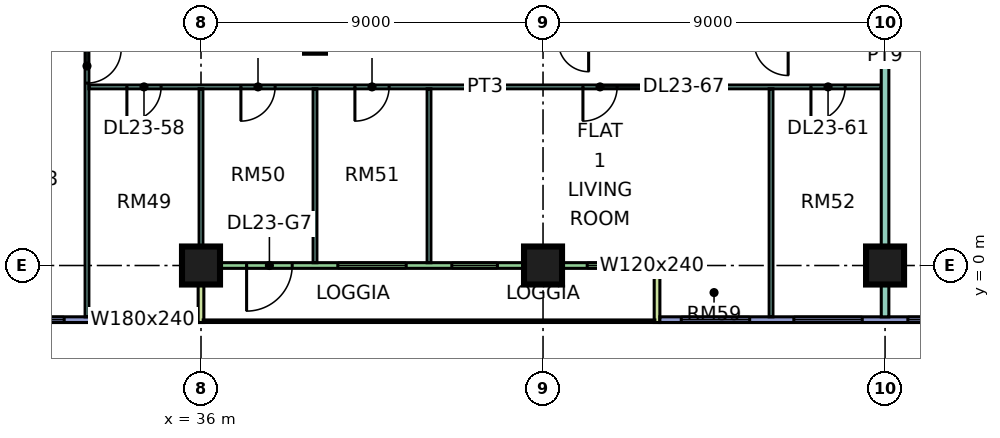
"""IFC4 building model, lengths in metres.
Left out: names, types, materials, properties, quantities, classifications, styles, units other than length and angle.
Written with IfcOpenShell. Run it as: python <this file> out.ifc"""

import sys

from ifc_helpers import new_model, si_unit, direction, frame, frame_2d, origin, origin_2d, place, context, subcontext, project, spatial, rectangle, extrude, element, fill, save


model = new_model("IFC4")
c1 = context("Model", 3, precision=1e-05, world=origin(), true_north=direction((0.0, 1.0)))
c2 = subcontext(c1, "Body", "Model", "MODEL_VIEW")
j1 = project(units=[si_unit("LENGTHUNIT", "METRE"), si_unit("PLANEANGLEUNIT", "RADIAN")], contexts=[c1])
p1 = place(None, origin())
s1 = spatial("IfcSite", under=j1, at=p1, CompositionType="ELEMENT")
p2 = place(p1, origin())
s2 = spatial("IfcBuilding", under=s1, at=p2, CompositionType="ELEMENT")
p3 = place(p2, frame((0.0, 0.0, 103.15)))
s3 = spatial("IfcBuildingStorey", under=s2, at=p3, CompositionType="ELEMENT", Elevation=103.15)
for number, where, z_axis, x_axis in (
    (1, (36.0, 0.0, 0.0), (0.0, 0.0, 1.0), (1.0, 0.0, 0.0)),
    (2, (45.0, 0.0, 0.0), (0.0, 0.0, 1.0), (1.0, 0.0, 0.0)),
    (3, (54.0, 0.0, 0.0), (0.0, 0.0, 1.0), (1.0, 0.0, 0.0)),
):
    element("IfcColumn", number, at=place(p3, frame(where, z_axis=z_axis, x_axis=x_axis)), inside=s3, PredefinedType="COLUMN", context=c2, shape_type="SweptSolid", body=[
        extrude(rectangle(XDim=1.0, YDim=1.0, at=origin_2d()), origin(), (0.0, 0.0, 1.0), 3.75),
    ])
p4 = place(p3, frame((37.2, 5.725, 0.0), z_axis=(0.0, 0.0, 1.0), x_axis=(1.0, 0.0, 0.0)))
e4 = element("IfcWall", 4, at=p4, inside=s3, PredefinedType="SHEAR", context=c2, shape_type="SweptSolid", body=[
    extrude(rectangle(XDim=3.45, YDim=0.25, at=frame_2d((1.725, 0.0))), origin(), (0.0, 0.0, 1.0), 3.75),
])
p5 = place(p3, frame((24.075, -1.425, 0.0), z_axis=(0.0, 0.0, 1.0), x_axis=(1.0, 0.0, 0.0)))
e5 = element("IfcWall", 5, at=p5, inside=s3, PredefinedType="SOLIDWALL", context=c2, shape_type="SweptSolid", body=[
    extrude(rectangle(XDim=11.85, YDim=0.15, at=frame_2d((5.925, 0.0))), origin(), (0.0, 0.0, 1.0), 3.35),
])
p6 = place(p5, frame((0.562, 0.0, 0.45)))
e6 = element("IfcOpeningElement", 6, at=p6, cuts=e5, PredefinedType="OPENING", context=c2, shape_type="SweptSolid", body=[
    extrude(rectangle(XDim=1.8, YDim=2.4, at=frame_2d((0.9, 1.2))), frame((0.0, 0.085, 0.0), z_axis=(0.0, -1.0, 0.0), x_axis=(1.0, 0.0, 0.0)), (0.0, 0.0, 1.0), 0.17),
])
p7 = place(p5, frame((3.525, 0.0, 0.45)))
e7 = element("IfcOpeningElement", 7, at=p7, cuts=e5, PredefinedType="OPENING", context=c2, shape_type="SweptSolid", body=[
    extrude(rectangle(XDim=1.8, YDim=2.4, at=frame_2d((0.9, 1.2))), frame((0.0, 0.085, 0.0), z_axis=(0.0, -1.0, 0.0), x_axis=(1.0, 0.0, 0.0)), (0.0, 0.0, 1.0), 0.17),
])
p8 = place(p5, frame((6.525, 0.0, 0.45)))
e8 = element("IfcOpeningElement", 8, at=p8, cuts=e5, PredefinedType="OPENING", context=c2, shape_type="SweptSolid", body=[
    extrude(rectangle(XDim=1.8, YDim=2.4, at=frame_2d((0.9, 1.2))), frame((0.0, 0.085, 0.0), z_axis=(0.0, -1.0, 0.0), x_axis=(1.0, 0.0, 0.0)), (0.0, 0.0, 1.0), 0.17),
])
p9 = place(p5, frame((9.488, 0.0, 0.45)))
e9 = element("IfcOpeningElement", 9, at=p9, cuts=e5, PredefinedType="OPENING", context=c2, shape_type="SweptSolid", body=[
    extrude(rectangle(XDim=1.8, YDim=2.4, at=frame_2d((0.9, 1.2))), frame((0.0, 0.085, 0.0), z_axis=(0.0, -1.0, 0.0), x_axis=(1.0, 0.0, 0.0)), (0.0, 0.0, 1.0), 0.17),
])
p10 = place(p3, frame((36.075, 0.0, 0.0), z_axis=(0.0, 0.0, 1.0), x_axis=(1.0, 0.0, 0.0)))
e10 = element("IfcWall", 10, at=p10, inside=s3, PredefinedType="SOLIDWALL", context=c2, shape_type="SweptSolid", body=[
    extrude(rectangle(XDim=11.85, YDim=0.15, at=frame_2d((5.925, 0.0))), origin(), (0.0, 0.0, 1.0), 3.35),
])
p11 = place(p10, frame((1.125, 0.0, 0.0)))
e11 = element("IfcOpeningElement", 11, at=p11, cuts=e10, PredefinedType="OPENING", context=c2, shape_type="SweptSolid", body=[
    extrude(rectangle(XDim=1.2, YDim=2.4, at=frame_2d((0.6, 1.2))), frame((0.0, 0.085, 0.0), z_axis=(0.0, -1.0, 0.0), x_axis=(1.0, 0.0, 0.0)), (0.0, 0.0, 1.0), 0.17),
])
p12 = place(p10, frame((3.525, 0.0, 0.45)))
e12 = element("IfcOpeningElement", 12, at=p12, cuts=e10, PredefinedType="OPENING", context=c2, shape_type="SweptSolid", body=[
    extrude(rectangle(XDim=1.8, YDim=2.4, at=frame_2d((0.9, 1.2))), frame((0.0, 0.085, 0.0), z_axis=(0.0, -1.0, 0.0), x_axis=(1.0, 0.0, 0.0)), (0.0, 0.0, 1.0), 0.17),
])
p13 = place(p10, frame((6.525, 0.0, 0.45)))
e13 = element("IfcOpeningElement", 13, at=p13, cuts=e10, PredefinedType="OPENING", context=c2, shape_type="SweptSolid", body=[
    extrude(rectangle(XDim=1.2, YDim=2.4, at=frame_2d((0.6, 1.2))), frame((0.0, 0.085, 0.0), z_axis=(0.0, -1.0, 0.0), x_axis=(1.0, 0.0, 0.0)), (0.0, 0.0, 1.0), 0.17),
])
p14 = place(p10, frame((10.087, 0.0, 0.45)))
e14 = element("IfcOpeningElement", 14, at=p14, cuts=e10, PredefinedType="OPENING", context=c2, shape_type="SweptSolid", body=[
    extrude(rectangle(XDim=1.2, YDim=2.4, at=frame_2d((0.6, 1.2))), frame((0.0, 0.085, 0.0), z_axis=(0.0, -1.0, 0.0), x_axis=(1.0, 0.0, 0.0)), (0.0, 0.0, 1.0), 0.17),
])
for number, where, z_axis, x_axis in (
    (15, (36.0, -1.5, 0.0), (0.0, 0.0, 1.0), (0.0, 1.0, 0.0)),
    (16, (48.0, -1.5, 0.0), (0.0, 0.0, 1.0), (0.0, 1.0, 0.0)),
):
    element("IfcWall", number, at=place(p3, frame(where, z_axis=z_axis, x_axis=x_axis)), inside=s3, PredefinedType="SOLIDWALL", context=c2, shape_type="SweptSolid", body=[
        extrude(rectangle(XDim=1.5, YDim=0.15, at=frame_2d((0.75, 0.0))), origin(), (0.0, 0.0, 1.0), 3.35),
    ])
p15 = place(p3, frame((48.075, -1.425, 0.0), z_axis=(0.0, 0.0, 1.0), x_axis=(1.0, 0.0, 0.0)))
e17 = element("IfcWall", 17, at=p15, inside=s3, PredefinedType="SOLIDWALL", context=c2, shape_type="SweptSolid", body=[
    extrude(rectangle(XDim=11.85, YDim=0.15, at=frame_2d((5.925, 0.0))), origin(), (0.0, 0.0, 1.0), 3.35),
])
p16 = place(p15, frame((0.562, 0.0, 0.45)))
e18 = element("IfcOpeningElement", 18, at=p16, cuts=e17, PredefinedType="OPENING", context=c2, shape_type="SweptSolid", body=[
    extrude(rectangle(XDim=1.8, YDim=2.4, at=frame_2d((0.9, 1.2))), frame((0.0, 0.085, 0.0), z_axis=(0.0, -1.0, 0.0), x_axis=(1.0, 0.0, 0.0)), (0.0, 0.0, 1.0), 0.17),
])
p17 = place(p15, frame((3.525, 0.0, 0.45)))
e19 = element("IfcOpeningElement", 19, at=p17, cuts=e17, PredefinedType="OPENING", context=c2, shape_type="SweptSolid", body=[
    extrude(rectangle(XDim=1.8, YDim=2.4, at=frame_2d((0.9, 1.2))), frame((0.0, 0.085, 0.0), z_axis=(0.0, -1.0, 0.0), x_axis=(1.0, 0.0, 0.0)), (0.0, 0.0, 1.0), 0.17),
])
p18 = place(p15, frame((6.525, 0.0, 0.45)))
e20 = element("IfcOpeningElement", 20, at=p18, cuts=e17, PredefinedType="OPENING", context=c2, shape_type="SweptSolid", body=[
    extrude(rectangle(XDim=1.8, YDim=2.4, at=frame_2d((0.9, 1.2))), frame((0.0, 0.085, 0.0), z_axis=(0.0, -1.0, 0.0), x_axis=(1.0, 0.0, 0.0)), (0.0, 0.0, 1.0), 0.17),
])
p19 = place(p15, frame((9.488, 0.0, 0.45)))
e21 = element("IfcOpeningElement", 21, at=p19, cuts=e17, PredefinedType="OPENING", context=c2, shape_type="SweptSolid", body=[
    extrude(rectangle(XDim=1.8, YDim=2.4, at=frame_2d((0.9, 1.2))), frame((0.0, 0.085, 0.0), z_axis=(0.0, -1.0, 0.0), x_axis=(1.0, 0.0, 0.0)), (0.0, 0.0, 1.0), 0.17),
])
p20 = place(p3, frame((33.0, -1.351, 0.0), z_axis=(0.0, 0.0, 1.0), x_axis=(0.0, 1.0, 0.0)))
e22 = element("IfcWall", 22, at=p20, inside=s3, PredefinedType="PARTITIONING", context=c2, shape_type="SweptSolid", body=[
    extrude(rectangle(XDim=7.201, YDim=0.1, at=frame_2d((3.601, 0.0))), origin(), (0.0, 0.0, 1.0), 3.35),
])
p21 = place(p20, frame((6.151, 0.0, 0.0)))
e23 = element("IfcOpeningElement", 23, at=p21, cuts=e22, PredefinedType="OPENING", context=c2, shape_type="SweptSolid", body=[
    extrude(rectangle(XDim=0.9, YDim=2.1, at=frame_2d((0.45, 1.05))), frame((0.0, 0.06, 0.0), z_axis=(0.0, -1.0, 0.0), x_axis=(1.0, 0.0, 0.0)), (0.0, 0.0, 1.0), 0.12),
])
p22 = place(p3, frame((33.05, 4.7, 0.0), z_axis=(0.0, 0.0, 1.0), x_axis=(1.0, 0.0, 0.0)))
e24 = element("IfcWall", 24, at=p22, inside=s3, PredefinedType="PARTITIONING", context=c2, shape_type="SweptSolid", body=[
    extrude(rectangle(XDim=20.85, YDim=0.1, at=frame_2d((10.425, 0.0))), origin(), (0.0, 0.0, 1.0), 3.35),
])
p23 = place(p22, frame((1.0, 0.0, 0.0)))
e25 = element("IfcOpeningElement", 25, at=p23, cuts=e24, PredefinedType="OPENING", context=c2, shape_type="SweptSolid", body=[
    extrude(rectangle(XDim=0.9, YDim=2.1, at=frame_2d((0.45, 1.05))), frame((0.0, 0.06, 0.0), z_axis=(0.0, -1.0, 0.0), x_axis=(1.0, 0.0, 0.0)), (0.0, 0.0, 1.0), 0.12),
])
p24 = place(p22, frame((4.0, 0.0, 0.0)))
e26 = element("IfcOpeningElement", 26, at=p24, cuts=e24, PredefinedType="OPENING", context=c2, shape_type="SweptSolid", body=[
    extrude(rectangle(XDim=0.9, YDim=2.1, at=frame_2d((0.45, 1.05))), frame((0.0, 0.06, 0.0), z_axis=(0.0, -1.0, 0.0), x_axis=(1.0, 0.0, 0.0)), (0.0, 0.0, 1.0), 0.12),
])
p25 = place(p22, frame((7.0, 0.0, 0.0)))
e27 = element("IfcOpeningElement", 27, at=p25, cuts=e24, PredefinedType="OPENING", context=c2, shape_type="SweptSolid", body=[
    extrude(rectangle(XDim=0.9, YDim=2.1, at=frame_2d((0.45, 1.05))), frame((0.0, 0.06, 0.0), z_axis=(0.0, -1.0, 0.0), x_axis=(1.0, 0.0, 0.0)), (0.0, 0.0, 1.0), 0.12),
])
p26 = place(p22, frame((19.0, 0.0, 0.0)))
e28 = element("IfcOpeningElement", 28, at=p26, cuts=e24, PredefinedType="OPENING", context=c2, shape_type="SweptSolid", body=[
    extrude(rectangle(XDim=0.9, YDim=2.1, at=frame_2d((0.45, 1.05))), frame((0.0, 0.06, 0.0), z_axis=(0.0, -1.0, 0.0), x_axis=(1.0, 0.0, 0.0)), (0.0, 0.0, 1.0), 0.12),
])
p27 = place(p22, frame((13.0, 0.0, 0.0)))
e29 = element("IfcOpeningElement", 29, at=p27, cuts=e24, PredefinedType="OPENING", context=c2, shape_type="SweptSolid", body=[
    extrude(rectangle(XDim=0.9, YDim=2.1, at=frame_2d((0.45, 1.05))), frame((0.0, 0.06, 0.0), z_axis=(0.0, -1.0, 0.0), x_axis=(1.0, 0.0, 0.0)), (0.0, 0.0, 1.0), 0.12),
])
p28 = place(p3, frame((36.0, 0.0, 0.0), z_axis=(0.0, 0.0, 1.0), x_axis=(0.0, 1.0, 0.0)))
e30 = element("IfcWall", 30, at=p28, inside=s3, PredefinedType="PARTITIONING", context=c2, shape_type="SweptSolid", body=[
    extrude(rectangle(XDim=4.65, YDim=0.1, at=frame_2d((2.325, 0.0))), origin(), (0.0, 0.0, 1.0), 3.35),
])
for number, where, z_axis, x_axis in (
    (31, (39.0, 0.074, 0.0), (0.0, 0.0, 1.0), (0.0, 1.0, 0.0)),
    (32, (42.0, 0.074, 0.0), (0.0, 0.0, 1.0), (0.0, 1.0, 0.0)),
):
    element("IfcWall", number, at=place(p3, frame(where, z_axis=z_axis, x_axis=x_axis)), inside=s3, PredefinedType="PARTITIONING", context=c2, shape_type="SweptSolid", body=[
        extrude(rectangle(XDim=4.576, YDim=0.1, at=frame_2d((2.288, 0.0))), origin(), (0.0, 0.0, 1.0), 3.35),
    ])
p29 = place(p3, frame((51.0, -1.35, 0.0), z_axis=(0.0, 0.0, 1.0), x_axis=(0.0, 1.0, 0.0)))
e33 = element("IfcWall", 33, at=p29, inside=s3, PredefinedType="PARTITIONING", context=c2, shape_type="SweptSolid", body=[
    extrude(rectangle(XDim=6.0, YDim=0.1, at=frame_2d((3.0, 0.0))), origin(), (0.0, 0.0, 1.0), 3.35),
])
p30 = place(p3, frame((54.0, -1.351, 0.0), z_axis=(0.0, 0.0, 1.0), x_axis=(0.0, 1.0, 0.0)))
e34 = element("IfcWall", 34, at=p30, inside=s3, PredefinedType="PARTITIONING", context=c2, shape_type="SweptSolid", body=[
    extrude(rectangle(XDim=13.751, YDim=0.2, at=frame_2d((6.875, 0.0))), origin(), (0.0, 0.0, 1.0), 3.35),
])
p31 = place(p8, origin())
e35 = element("IfcWindow", 35, at=p31, inside=s3, PartitioningType="SINGLE_PANEL", PredefinedType="WINDOW", context=c2, shape_type="SweptSolid", body=[
    extrude(rectangle(XDim=1.8, YDim=2.4, at=frame_2d((0.9, 1.2))), frame((0.0, 0.03, 0.0), z_axis=(0.0, -1.0, 0.0), x_axis=(1.0, 0.0, 0.0)), (0.0, 0.0, 1.0), 0.06),
])
fill(e8, e35)
p32 = place(p9, origin())
e36 = element("IfcWindow", 36, at=p32, inside=s3, PartitioningType="SINGLE_PANEL", PredefinedType="WINDOW", context=c2, shape_type="SweptSolid", body=[
    extrude(rectangle(XDim=1.8, YDim=2.4, at=frame_2d((0.9, 1.2))), frame((0.0, 0.03, 0.0), z_axis=(0.0, -1.0, 0.0), x_axis=(1.0, 0.0, 0.0)), (0.0, 0.0, 1.0), 0.06),
])
fill(e9, e36)
p33 = place(p11, frame((1.2, 0.0, 0.0), z_axis=(0.0, 0.0, 1.0), x_axis=(-1.0, 0.0, 0.0)))
e37 = element("IfcDoor", 37, at=p33, inside=s3, OperationType="DOUBLE_DOOR_SINGLE_SWING", PredefinedType="DOOR", context=c2, shape_type="SweptSolid", body=[
    extrude(rectangle(XDim=1.2, YDim=2.4, at=frame_2d((0.6, 1.2))), frame((0.0, 0.025, 0.0), z_axis=(0.0, -1.0, 0.0), x_axis=(1.0, 0.0, 0.0)), (0.0, 0.0, 1.0), 0.05),
])
fill(e11, e37)
p34 = place(p12, origin())
e38 = element("IfcWindow", 38, at=p34, inside=s3, PartitioningType="SINGLE_PANEL", PredefinedType="WINDOW", context=c2, shape_type="SweptSolid", body=[
    extrude(rectangle(XDim=1.8, YDim=2.4, at=frame_2d((0.9, 1.2))), frame((0.0, 0.03, 0.0), z_axis=(0.0, -1.0, 0.0), x_axis=(1.0, 0.0, 0.0)), (0.0, 0.0, 1.0), 0.06),
])
fill(e12, e38)
p35 = place(p13, origin())
e39 = element("IfcWindow", 39, at=p35, inside=s3, PartitioningType="SINGLE_PANEL", PredefinedType="WINDOW", context=c2, shape_type="SweptSolid", body=[
    extrude(rectangle(XDim=1.2, YDim=2.4, at=frame_2d((0.6, 1.2))), frame((0.0, 0.03, 0.0), z_axis=(0.0, -1.0, 0.0), x_axis=(1.0, 0.0, 0.0)), (0.0, 0.0, 1.0), 0.06),
])
fill(e13, e39)
p36 = place(p14, origin())
e40 = element("IfcWindow", 40, at=p36, inside=s3, PartitioningType="SINGLE_PANEL", PredefinedType="WINDOW", context=c2, shape_type="SweptSolid", body=[
    extrude(rectangle(XDim=1.2, YDim=2.4, at=frame_2d((0.6, 1.2))), frame((0.0, 0.03, 0.0), z_axis=(0.0, -1.0, 0.0), x_axis=(1.0, 0.0, 0.0)), (0.0, 0.0, 1.0), 0.06),
])
fill(e14, e40)
p37 = place(p16, origin())
e41 = element("IfcWindow", 41, at=p37, inside=s3, PartitioningType="SINGLE_PANEL", PredefinedType="WINDOW", context=c2, shape_type="SweptSolid", body=[
    extrude(rectangle(XDim=1.8, YDim=2.4, at=frame_2d((0.9, 1.2))), frame((0.0, 0.03, 0.0), z_axis=(0.0, -1.0, 0.0), x_axis=(1.0, 0.0, 0.0)), (0.0, 0.0, 1.0), 0.06),
])
fill(e18, e41)
p38 = place(p17, origin())
e42 = element("IfcWindow", 42, at=p38, inside=s3, PartitioningType="SINGLE_PANEL", PredefinedType="WINDOW", context=c2, shape_type="SweptSolid", body=[
    extrude(rectangle(XDim=1.8, YDim=2.4, at=frame_2d((0.9, 1.2))), frame((0.0, 0.03, 0.0), z_axis=(0.0, -1.0, 0.0), x_axis=(1.0, 0.0, 0.0)), (0.0, 0.0, 1.0), 0.06),
])
fill(e19, e42)
p39 = place(p18, origin())
e43 = element("IfcWindow", 43, at=p39, inside=s3, PartitioningType="SINGLE_PANEL", PredefinedType="WINDOW", context=c2, shape_type="SweptSolid", body=[
    extrude(rectangle(XDim=1.8, YDim=2.4, at=frame_2d((0.9, 1.2))), frame((0.0, 0.03, 0.0), z_axis=(0.0, -1.0, 0.0), x_axis=(1.0, 0.0, 0.0)), (0.0, 0.0, 1.0), 0.06),
])
fill(e20, e43)
p40 = place(p21, origin())
e44 = element("IfcDoor", 44, at=p40, inside=s3, OperationType="SINGLE_SWING_RIGHT", PredefinedType="DOOR", context=c2, shape_type="SweptSolid", body=[
    extrude(rectangle(XDim=0.9, YDim=2.1, at=frame_2d((0.45, 1.05))), frame((0.0, 0.025, 0.0), z_axis=(0.0, -1.0, 0.0), x_axis=(1.0, 0.0, 0.0)), (0.0, 0.0, 1.0), 0.05),
])
fill(e23, e44)
p41 = place(p23, frame((0.9, 0.0, 0.0), z_axis=(0.0, 0.0, 1.0), x_axis=(-1.0, 0.0, 0.0)))
e45 = element("IfcDoor", 45, at=p41, inside=s3, OperationType="SINGLE_SWING_LEFT", PredefinedType="DOOR", context=c2, shape_type="SweptSolid", body=[
    extrude(rectangle(XDim=0.9, YDim=2.1, at=frame_2d((0.45, 1.05))), frame((0.0, 0.025, 0.0), z_axis=(0.0, -1.0, 0.0), x_axis=(1.0, 0.0, 0.0)), (0.0, 0.0, 1.0), 0.05),
])
fill(e25, e45)
p42 = place(p24, frame((0.9, 0.0, 0.0), z_axis=(0.0, 0.0, 1.0), x_axis=(-1.0, 0.0, 0.0)))
e46 = element("IfcDoor", 46, at=p42, inside=s3, OperationType="SINGLE_SWING_LEFT", PredefinedType="DOOR", context=c2, shape_type="SweptSolid", body=[
    extrude(rectangle(XDim=0.9, YDim=2.1, at=frame_2d((0.45, 1.05))), frame((0.0, 0.025, 0.0), z_axis=(0.0, -1.0, 0.0), x_axis=(1.0, 0.0, 0.0)), (0.0, 0.0, 1.0), 0.05),
])
fill(e26, e46)
p43 = place(p25, frame((0.9, 0.0, 0.0), z_axis=(0.0, 0.0, 1.0), x_axis=(-1.0, 0.0, 0.0)))
e47 = element("IfcDoor", 47, at=p43, inside=s3, OperationType="SINGLE_SWING_LEFT", PredefinedType="DOOR", context=c2, shape_type="SweptSolid", body=[
    extrude(rectangle(XDim=0.9, YDim=2.1, at=frame_2d((0.45, 1.05))), frame((0.0, 0.025, 0.0), z_axis=(0.0, -1.0, 0.0), x_axis=(1.0, 0.0, 0.0)), (0.0, 0.0, 1.0), 0.05),
])
fill(e27, e47)
p44 = place(p26, frame((0.9, 0.0, 0.0), z_axis=(0.0, 0.0, 1.0), x_axis=(-1.0, 0.0, 0.0)))
e48 = element("IfcDoor", 48, at=p44, inside=s3, OperationType="SINGLE_SWING_LEFT", PredefinedType="DOOR", context=c2, shape_type="SweptSolid", body=[
    extrude(rectangle(XDim=0.9, YDim=2.1, at=frame_2d((0.45, 1.05))), frame((0.0, 0.025, 0.0), z_axis=(0.0, -1.0, 0.0), x_axis=(1.0, 0.0, 0.0)), (0.0, 0.0, 1.0), 0.05),
])
fill(e28, e48)
p45 = place(p27, frame((0.9, 0.0, 0.0), z_axis=(0.0, 0.0, 1.0), x_axis=(-1.0, 0.0, 0.0)))
e49 = element("IfcDoor", 49, at=p45, inside=s3, OperationType="SINGLE_SWING_LEFT", PredefinedType="DOOR", context=c2, shape_type="SweptSolid", body=[
    extrude(rectangle(XDim=0.9, YDim=2.1, at=frame_2d((0.45, 1.05))), frame((0.0, 0.025, 0.0), z_axis=(0.0, -1.0, 0.0), x_axis=(1.0, 0.0, 0.0)), (0.0, 0.0, 1.0), 0.05),
])
fill(e29, e49)
save(model, sys.argv[1])
